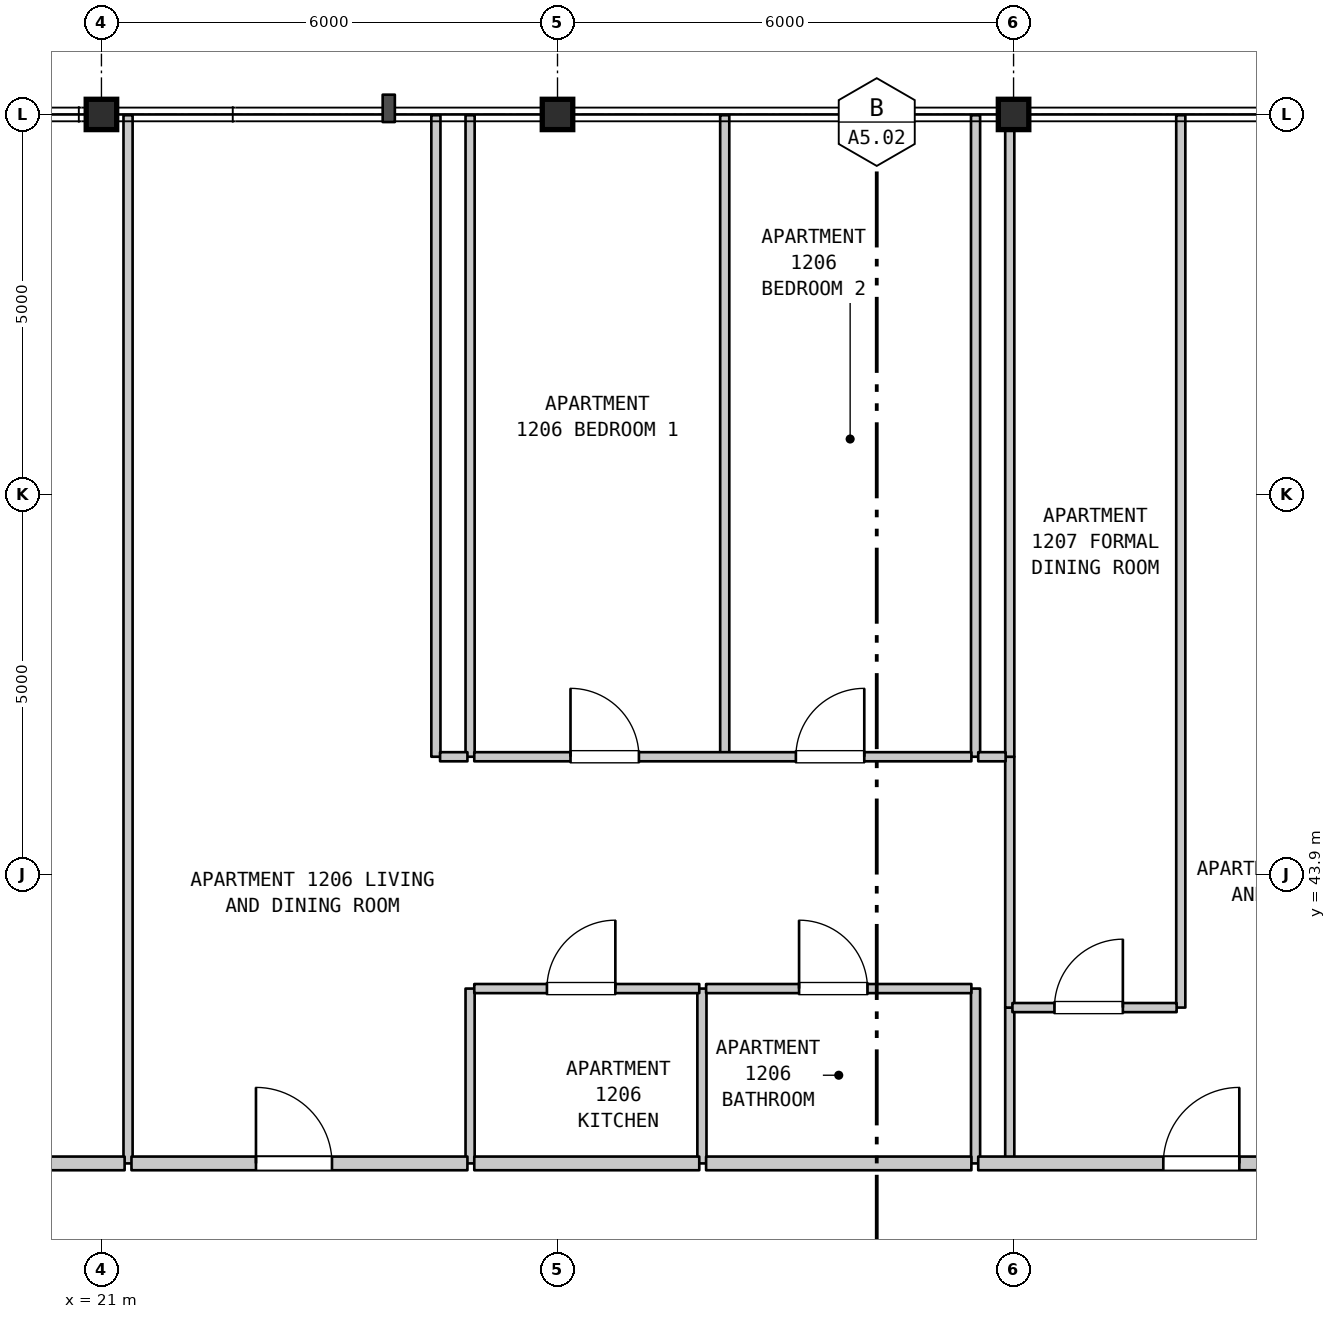
"""IFC4 building model, lengths in metres.
Left out: names, types, materials, properties, quantities, classifications, styles, units other than length and angle.
Written with IfcOpenShell. Run it as: python <this file> out.ifc"""

import sys

from ifc_helpers import new_model, si_unit, direction, frame, frame_2d, origin, origin_2d, place, context, subcontext, project, spatial, rectangle, i_section, extrude, element, fill, save


model = new_model("IFC4")
c1 = context("Model", 3, precision=1e-05, world=origin(), true_north=direction((0.0, 1.0)))
c2 = subcontext(c1, "Body", "Model", "MODEL_VIEW")
j1 = project(units=[si_unit("LENGTHUNIT", "METRE"), si_unit("PLANEANGLEUNIT", "RADIAN")], contexts=[c1])
p1 = place(None, origin())
s1 = spatial("IfcSite", under=j1, at=p1, CompositionType="ELEMENT")
p2 = place(p1, origin())
s2 = spatial("IfcBuilding", under=s1, at=p2, CompositionType="ELEMENT")
p3 = place(p2, frame((0.0, 0.0, 53.6)))
s3 = spatial("IfcBuildingStorey", under=s2, at=p3, CompositionType="ELEMENT", Elevation=53.6)
for number, where, z_axis, x_axis in (
    (1, (21.0, 53.9, 0.0), (0.0, 0.0, 1.0), (1.0, 0.0, 0.0)),
    (2, (27.0, 53.9, 0.0), (0.0, 0.0, 1.0), (1.0, 0.0, 0.0)),
    (3, (33.0, 53.9, 0.0), (0.0, 0.0, 1.0), (1.0, 0.0, 0.0)),
):
    element("IfcColumn", number, at=place(p3, frame(where, z_axis=z_axis, x_axis=x_axis)), inside=s3, PredefinedType="COLUMN", context=c2, shape_type="SweptSolid", body=[
        extrude(i_section(OverallWidth=0.401, OverallDepth=0.399, WebThickness=0.025, FlangeThickness=0.04, FilletRadius=0.015, at=origin_2d()), origin(), (0.0, 0.0, 1.0), 3.7),
    ])
p4 = place(p3, frame((21.35, 40.1, 0.0), z_axis=(0.0, 0.0, 1.0), x_axis=(0.0, 1.0, 0.0)))
e4 = element("IfcWall", 4, at=p4, inside=s3, PredefinedType="PARTITIONING", context=c2, shape_type="SweptSolid", body=[
    extrude(rectangle(XDim=13.79, YDim=0.12, at=frame_2d((6.895, 0.0))), origin(), (0.0, 0.0, 1.0), 3.385),
])
p5 = place(p3, frame((25.4, 45.45, 0.0), z_axis=(0.0, 0.0, 1.0), x_axis=(0.0, 1.0, 0.0)))
e5 = element("IfcWall", 5, at=p5, inside=s3, PredefinedType="PARTITIONING", context=c2, shape_type="SweptSolid", body=[
    extrude(rectangle(XDim=8.44, YDim=0.12, at=frame_2d((4.22, 0.0))), origin(), (0.0, 0.0, 1.0), 3.385),
])
p6 = place(p3, frame((25.85, 40.1, 0.0), z_axis=(0.0, 0.0, 1.0), x_axis=(0.0, 1.0, 0.0)))
e6 = element("IfcWall", 6, at=p6, inside=s3, PredefinedType="PARTITIONING", context=c2, shape_type="SweptSolid", body=[
    extrude(rectangle(XDim=2.3, YDim=0.12, at=frame_2d((1.15, 0.0))), origin(), (0.0, 0.0, 1.0), 3.385),
])
p7 = place(p3, frame((25.85, 45.45, 0.0), z_axis=(0.0, 0.0, 1.0), x_axis=(0.0, 1.0, 0.0)))
e7 = element("IfcWall", 7, at=p7, inside=s3, PredefinedType="PARTITIONING", context=c2, shape_type="SweptSolid", body=[
    extrude(rectangle(XDim=8.44, YDim=0.12, at=frame_2d((4.22, 0.0))), origin(), (0.0, 0.0, 1.0), 3.385),
])
p8 = place(p3, frame((28.9, 40.1, 0.0), z_axis=(0.0, 0.0, 1.0), x_axis=(0.0, 1.0, 0.0)))
e8 = element("IfcWall", 8, at=p8, inside=s3, PredefinedType="PARTITIONING", context=c2, shape_type="SweptSolid", body=[
    extrude(rectangle(XDim=2.3, YDim=0.12, at=frame_2d((1.15, 0.0))), origin(), (0.0, 0.0, 1.0), 3.385),
])
p9 = place(p3, frame((29.2, 45.45, 0.0), z_axis=(0.0, 0.0, 1.0), x_axis=(0.0, 1.0, 0.0)))
e9 = element("IfcWall", 9, at=p9, inside=s3, PredefinedType="PARTITIONING", context=c2, shape_type="SweptSolid", body=[
    extrude(rectangle(XDim=8.44, YDim=0.12, at=frame_2d((4.22, 0.0))), origin(), (0.0, 0.0, 1.0), 3.385),
])
p10 = place(p3, frame((32.5, 40.1, 0.0), z_axis=(0.0, 0.0, 1.0), x_axis=(0.0, 1.0, 0.0)))
e10 = element("IfcWall", 10, at=p10, inside=s3, PredefinedType="PARTITIONING", context=c2, shape_type="SweptSolid", body=[
    extrude(rectangle(XDim=2.3, YDim=0.12, at=frame_2d((1.15, 0.0))), origin(), (0.0, 0.0, 1.0), 3.385),
])
p11 = place(p3, frame((32.5, 45.45, 0.0), z_axis=(0.0, 0.0, 1.0), x_axis=(0.0, 1.0, 0.0)))
e11 = element("IfcWall", 11, at=p11, inside=s3, PredefinedType="PARTITIONING", context=c2, shape_type="SweptSolid", body=[
    extrude(rectangle(XDim=8.44, YDim=0.12, at=frame_2d((4.22, 0.0))), origin(), (0.0, 0.0, 1.0), 3.385),
])
p12 = place(p3, frame((32.95, 40.1, 0.0), z_axis=(0.0, 0.0, 1.0), x_axis=(0.0, 1.0, 0.0)))
e12 = element("IfcWall", 12, at=p12, inside=s3, PredefinedType="PARTITIONING", context=c2, shape_type="SweptSolid", body=[
    extrude(rectangle(XDim=2.05, YDim=0.12, at=frame_2d((1.025, 0.0))), origin(), (0.0, 0.0, 1.0), 2.785),
])
p13 = place(p3, frame((32.95, 42.15, 0.0), z_axis=(0.0, 0.0, 1.0), x_axis=(0.0, 1.0, 0.0)))
e13 = element("IfcWall", 13, at=p13, inside=s3, PredefinedType="PARTITIONING", context=c2, shape_type="SweptSolid", body=[
    extrude(rectangle(XDim=3.3, YDim=0.12, at=frame_2d((1.65, 0.0))), origin(), (0.0, 0.0, 1.0), 2.785),
])
p14 = place(p3, frame((32.95, 45.45, 0.0), z_axis=(0.0, 0.0, 1.0), x_axis=(0.0, 1.0, 0.0)))
e14 = element("IfcWall", 14, at=p14, inside=s3, PredefinedType="PARTITIONING", context=c2, shape_type="SweptSolid", body=[
    extrude(rectangle(XDim=8.44, YDim=0.12, at=frame_2d((4.22, 0.0))), origin(), (0.0, 0.0, 1.0), 2.785),
])
p15 = place(p3, frame((35.2, 42.15, 0.0), z_axis=(0.0, 0.0, 1.0), x_axis=(0.0, 1.0, 0.0)))
e15 = element("IfcWall", 15, at=p15, inside=s3, PredefinedType="PARTITIONING", context=c2, shape_type="SweptSolid", body=[
    extrude(rectangle(XDim=11.74, YDim=0.12, at=frame_2d((5.87, 0.0))), origin(), (0.0, 0.0, 1.0), 3.385),
])
p16 = place(p3, frame((18.895, 40.1, 0.0), z_axis=(0.0, 0.0, 1.0), x_axis=(1.0, 0.0, 0.0)))
e16 = element("IfcWall", 16, at=p16, inside=s3, PredefinedType="STANDARD", context=c2, shape_type="SweptSolid", body=[
    extrude(rectangle(XDim=2.41, YDim=0.18, at=frame_2d((1.205, 0.0))), origin(), (0.0, 0.0, 1.0), 3.385),
])
p17 = place(p3, frame((21.395, 40.1, 0.0), z_axis=(0.0, 0.0, 1.0), x_axis=(1.0, 0.0, 0.0)))
e17 = element("IfcWall", 17, at=p17, inside=s3, PredefinedType="STANDARD", context=c2, shape_type="SweptSolid", body=[
    extrude(rectangle(XDim=4.42, YDim=0.18, at=frame_2d((2.21, 0.0))), origin(), (0.0, 0.0, 1.0), 3.385),
])
p18 = place(p17, frame((1.638, 0.0, 0.0)))
e18 = element("IfcOpeningElement", 18, at=p18, cuts=e17, PredefinedType="OPENING", context=c2, shape_type="SweptSolid", body=[
    extrude(rectangle(XDim=1.0, YDim=2.15, at=frame_2d((0.5, 1.075))), frame((0.0, 0.1, 0.0), z_axis=(0.0, -1.0, 0.0), x_axis=(1.0, 0.0, 0.0)), (0.0, 0.0, 1.0), 0.2),
])
p19 = place(p3, frame((25.905, 40.1, 0.0), z_axis=(0.0, 0.0, 1.0), x_axis=(1.0, 0.0, 0.0)))
e19 = element("IfcWall", 19, at=p19, inside=s3, PredefinedType="STANDARD", context=c2, shape_type="SweptSolid", body=[
    extrude(rectangle(XDim=2.96, YDim=0.18, at=frame_2d((1.48, 0.0))), origin(), (0.0, 0.0, 1.0), 3.385),
])
p20 = place(p3, frame((28.955, 40.1, 0.0), z_axis=(0.0, 0.0, 1.0), x_axis=(1.0, 0.0, 0.0)))
e20 = element("IfcWall", 20, at=p20, inside=s3, PredefinedType="STANDARD", context=c2, shape_type="SweptSolid", body=[
    extrude(rectangle(XDim=3.49, YDim=0.18, at=frame_2d((1.745, 0.0))), origin(), (0.0, 0.0, 1.0), 3.385),
])
p21 = place(p3, frame((32.535, 40.1, 0.0), z_axis=(0.0, 0.0, 1.0), x_axis=(1.0, 0.0, 0.0)))
e21 = element("IfcWall", 21, at=p21, inside=s3, PredefinedType="STANDARD", context=c2, shape_type="SweptSolid", body=[
    extrude(rectangle(XDim=5.545, YDim=0.18, at=frame_2d((2.772, 0.0))), origin(), (0.0, 0.0, 1.0), 3.385),
])
p22 = place(p21, frame((2.435, 0.0, 0.0)))
e22 = element("IfcOpeningElement", 22, at=p22, cuts=e21, PredefinedType="OPENING", context=c2, shape_type="SweptSolid", body=[
    extrude(rectangle(XDim=1.0, YDim=2.15, at=frame_2d((0.5, 1.075))), frame((0.0, 0.1, 0.0), z_axis=(0.0, -1.0, 0.0), x_axis=(1.0, 0.0, 0.0)), (0.0, 0.0, 1.0), 0.2),
])
p23 = place(p3, frame((32.985, 42.15, 0.0), z_axis=(0.0, 0.0, 1.0), x_axis=(1.0, 0.0, 0.0)))
e23 = element("IfcWall", 23, at=p23, inside=s3, PredefinedType="PARTITIONING", context=c2, shape_type="SweptSolid", body=[
    extrude(rectangle(XDim=2.16, YDim=0.12, at=frame_2d((1.08, 0.0))), origin(), (0.0, 0.0, 1.0), 3.385),
])
p24 = place(p23, frame((0.553, 0.0, 0.0)))
e24 = element("IfcOpeningElement", 24, at=p24, cuts=e23, PredefinedType="OPENING", context=c2, shape_type="SweptSolid", body=[
    extrude(rectangle(XDim=0.9, YDim=2.15, at=frame_2d((0.45, 1.075))), frame((0.0, 0.07, 0.0), z_axis=(0.0, -1.0, 0.0), x_axis=(1.0, 0.0, 0.0)), (0.0, 0.0, 1.0), 0.14),
])
p25 = place(p3, frame((25.905, 42.4, 0.0), z_axis=(0.0, 0.0, 1.0), x_axis=(1.0, 0.0, 0.0)))
e25 = element("IfcWall", 25, at=p25, inside=s3, PredefinedType="PARTITIONING", context=c2, shape_type="SweptSolid", body=[
    extrude(rectangle(XDim=2.96, YDim=0.12, at=frame_2d((1.48, 0.0))), origin(), (0.0, 0.0, 1.0), 3.385),
])
p26 = place(p25, frame((0.956, 0.0, 0.0)))
e26 = element("IfcOpeningElement", 26, at=p26, cuts=e25, PredefinedType="OPENING", context=c2, shape_type="SweptSolid", body=[
    extrude(rectangle(XDim=0.9, YDim=2.15, at=frame_2d((0.45, 1.075))), frame((0.0, 0.07, 0.0), z_axis=(0.0, -1.0, 0.0), x_axis=(1.0, 0.0, 0.0)), (0.0, 0.0, 1.0), 0.14),
])
p27 = place(p3, frame((28.955, 42.4, 0.0), z_axis=(0.0, 0.0, 1.0), x_axis=(1.0, 0.0, 0.0)))
e27 = element("IfcWall", 27, at=p27, inside=s3, PredefinedType="PARTITIONING", context=c2, shape_type="SweptSolid", body=[
    extrude(rectangle(XDim=3.49, YDim=0.12, at=frame_2d((1.745, 0.0))), origin(), (0.0, 0.0, 1.0), 3.385),
])
p28 = place(p27, frame((1.223, 0.0, 0.0)))
e28 = element("IfcOpeningElement", 28, at=p28, cuts=e27, PredefinedType="OPENING", context=c2, shape_type="SweptSolid", body=[
    extrude(rectangle(XDim=0.9, YDim=2.1, at=frame_2d((0.45, 1.05))), frame((0.0, 0.07, 0.0), z_axis=(0.0, -1.0, 0.0), x_axis=(1.0, 0.0, 0.0)), (0.0, 0.0, 1.0), 0.14),
])
p29 = place(p3, frame((25.455, 45.45, 0.0), z_axis=(0.0, 0.0, 1.0), x_axis=(1.0, 0.0, 0.0)))
e29 = element("IfcWall", 29, at=p29, inside=s3, PredefinedType="PARTITIONING", context=c2, shape_type="SweptSolid", body=[
    extrude(rectangle(XDim=0.36, YDim=0.12, at=frame_2d((0.18, 0.0))), origin(), (0.0, 0.0, 1.0), 3.385),
])
p30 = place(p3, frame((25.905, 45.45, 0.0), z_axis=(0.0, 0.0, 1.0), x_axis=(1.0, 0.0, 0.0)))
e30 = element("IfcWall", 30, at=p30, inside=s3, PredefinedType="PARTITIONING", context=c2, shape_type="SweptSolid", body=[
    extrude(rectangle(XDim=6.54, YDim=0.12, at=frame_2d((3.27, 0.0))), origin(), (0.0, 0.0, 1.0), 3.385),
])
p31 = place(p30, frame((1.266, 0.0, 0.0)))
e31 = element("IfcOpeningElement", 31, at=p31, cuts=e30, PredefinedType="OPENING", context=c2, shape_type="SweptSolid", body=[
    extrude(rectangle(XDim=0.9, YDim=2.15, at=frame_2d((0.45, 1.075))), frame((0.0, 0.07, 0.0), z_axis=(0.0, -1.0, 0.0), x_axis=(1.0, 0.0, 0.0)), (0.0, 0.0, 1.0), 0.14),
])
p32 = place(p30, frame((4.231, 0.0, 0.0)))
e32 = element("IfcOpeningElement", 32, at=p32, cuts=e30, PredefinedType="OPENING", context=c2, shape_type="SweptSolid", body=[
    extrude(rectangle(XDim=0.9, YDim=2.15, at=frame_2d((0.45, 1.075))), frame((0.0, 0.07, 0.0), z_axis=(0.0, -1.0, 0.0), x_axis=(1.0, 0.0, 0.0)), (0.0, 0.0, 1.0), 0.14),
])
p33 = place(p3, frame((32.535, 45.45, 0.0), z_axis=(0.0, 0.0, 1.0), x_axis=(1.0, 0.0, 0.0)))
e33 = element("IfcWall", 33, at=p33, inside=s3, PredefinedType="PARTITIONING", context=c2, shape_type="SweptSolid", body=[
    extrude(rectangle(XDim=0.36, YDim=0.12, at=frame_2d((0.18, 0.0))), origin(), (0.0, 0.0, 1.0), 3.385),
])
p34 = place(p18, origin())
e34 = element("IfcDoor", 34, at=p34, inside=s3, OperationType="SINGLE_SWING_LEFT", PredefinedType="DOOR", context=c2, shape_type="SweptSolid", body=[
    extrude(rectangle(XDim=1.0, YDim=2.15, at=frame_2d((0.5, 1.075))), frame((0.0, 0.025, 0.0), z_axis=(0.0, -1.0, 0.0), x_axis=(1.0, 0.0, 0.0)), (0.0, 0.0, 1.0), 0.05),
])
fill(e18, e34)
p35 = place(p22, origin())
e35 = element("IfcDoor", 35, at=p35, inside=s3, OperationType="SINGLE_SWING_RIGHT", PredefinedType="DOOR", context=c2, shape_type="SweptSolid", body=[
    extrude(rectangle(XDim=1.0, YDim=2.15, at=frame_2d((0.5, 1.075))), frame((0.0, 0.025, 0.0), z_axis=(0.0, -1.0, 0.0), x_axis=(1.0, 0.0, 0.0)), (0.0, 0.0, 1.0), 0.05),
])
fill(e22, e35)
p36 = place(p24, origin())
e36 = element("IfcDoor", 36, at=p36, inside=s3, OperationType="SINGLE_SWING_RIGHT", PredefinedType="DOOR", context=c2, shape_type="SweptSolid", body=[
    extrude(rectangle(XDim=0.9, YDim=2.15, at=frame_2d((0.45, 1.075))), frame((0.0, 0.025, 0.0), z_axis=(0.0, -1.0, 0.0), x_axis=(1.0, 0.0, 0.0)), (0.0, 0.0, 1.0), 0.05),
])
fill(e24, e36)
p37 = place(p26, origin())
e37 = element("IfcDoor", 37, at=p37, inside=s3, OperationType="SINGLE_SWING_RIGHT", PredefinedType="DOOR", context=c2, shape_type="SweptSolid", body=[
    extrude(rectangle(XDim=0.9, YDim=2.15, at=frame_2d((0.45, 1.075))), frame((0.0, 0.025, 0.0), z_axis=(0.0, -1.0, 0.0), x_axis=(1.0, 0.0, 0.0)), (0.0, 0.0, 1.0), 0.05),
])
fill(e26, e37)
p38 = place(p28, origin())
e38 = element("IfcDoor", 38, at=p38, inside=s3, OperationType="SINGLE_SWING_LEFT", PredefinedType="DOOR", context=c2, shape_type="SweptSolid", body=[
    extrude(rectangle(XDim=0.9, YDim=2.1, at=frame_2d((0.45, 1.05))), frame((0.0, 0.025, 0.0), z_axis=(0.0, -1.0, 0.0), x_axis=(1.0, 0.0, 0.0)), (0.0, 0.0, 1.0), 0.05),
])
fill(e28, e38)
p39 = place(p31, origin())
e39 = element("IfcDoor", 39, at=p39, inside=s3, OperationType="SINGLE_SWING_LEFT", PredefinedType="DOOR", context=c2, shape_type="SweptSolid", body=[
    extrude(rectangle(XDim=0.9, YDim=2.15, at=frame_2d((0.45, 1.075))), frame((0.0, 0.025, 0.0), z_axis=(0.0, -1.0, 0.0), x_axis=(1.0, 0.0, 0.0)), (0.0, 0.0, 1.0), 0.05),
])
fill(e31, e39)
p40 = place(p32, origin())
e40 = element("IfcDoor", 40, at=p40, inside=s3, OperationType="SINGLE_SWING_RIGHT", PredefinedType="DOOR", context=c2, shape_type="SweptSolid", body=[
    extrude(rectangle(XDim=0.9, YDim=2.15, at=frame_2d((0.45, 1.075))), frame((0.0, 0.025, 0.0), z_axis=(0.0, -1.0, 0.0), x_axis=(1.0, 0.0, 0.0)), (0.0, 0.0, 1.0), 0.05),
])
fill(e32, e40)
save(model, sys.argv[1])
